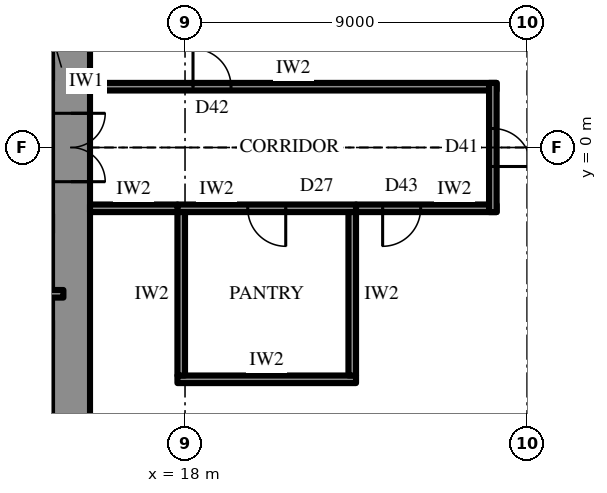
"""IFC4 building model, lengths in metres.
Left out: names, types, materials, properties, quantities, classifications, styles, units other than length and angle.
Written with IfcOpenShell. Run it as: python <this file> out.ifc"""

import sys

from ifc_helpers import new_model, si_unit, direction, frame, frame_2d, origin, place, context, subcontext, project, spatial, rectangle, extrude, element, fill, save


model = new_model("IFC4")
c1 = context("Model", 3, precision=1e-05, world=origin(), true_north=direction((0.0, 1.0)))
c2 = subcontext(c1, "Body", "Model", "MODEL_VIEW")
j1 = project(units=[si_unit("LENGTHUNIT", "METRE"), si_unit("PLANEANGLEUNIT", "RADIAN")], contexts=[c1])
p1 = place(None, origin())
s1 = spatial("IfcSite", under=j1, at=p1, CompositionType="ELEMENT")
p2 = place(p1, origin())
s2 = spatial("IfcBuilding", under=s1, at=p2, CompositionType="ELEMENT")
p3 = place(p2, frame((0.0, 0.0, 278.5)))
s3 = spatial("IfcBuildingStorey", under=s2, at=p3, CompositionType="ELEMENT", Elevation=278.5)
p4 = place(p3, frame((15.0, -10.7, 0.0), z_axis=(0.0, 0.0, 1.0), x_axis=(0.0, 1.0, 0.0)))
e1 = element("IfcWall", 1, at=p4, inside=s3, PredefinedType="SHEAR", context=c2, shape_type="SweptSolid", body=[
    extrude(rectangle(XDim=21.4, YDim=1.0, at=frame_2d((10.7, 0.0))), origin(), (0.0, 0.0, 1.0), 4.2),
])
p5 = place(p4, frame((9.8, 0.0, 0.0)))
e2 = element("IfcOpeningElement", 2, at=p5, cuts=e1, PredefinedType="OPENING", context=c2, shape_type="SweptSolid", body=[
    extrude(rectangle(XDim=1.8, YDim=2.4, at=frame_2d((0.9, 1.2))), frame((0.0, 0.51, 0.0), z_axis=(0.0, -1.0, 0.0), x_axis=(1.0, 0.0, 0.0)), (0.0, 0.0, 1.0), 1.02),
])
p6 = place(p3, frame((12.3, 2.0, 0.0), z_axis=(0.0, 0.0, 1.0), x_axis=(1.0, 0.0, 0.0)))
e3 = element("IfcWall", 3, at=p6, inside=s3, PredefinedType="SHEAR", context=c2, shape_type="SweptSolid", body=[
    extrude(rectangle(XDim=2.2, YDim=0.5, at=frame_2d((1.1, 0.0))), origin(), (0.0, 0.0, 1.0), 4.2),
])
p7 = place(p6, frame((0.8, 0.0, 0.0)))
e4 = element("IfcOpeningElement", 4, at=p7, cuts=e3, PredefinedType="OPENING", context=c2, shape_type="SweptSolid", body=[
    extrude(rectangle(XDim=0.9, YDim=2.2, at=frame_2d((0.45, 1.1))), frame((0.0, 0.26, 0.0), z_axis=(0.0, -1.0, 0.0), x_axis=(1.0, 0.0, 0.0)), (0.0, 0.0, 1.0), 0.52),
])
p8 = place(p3, frame((18.707, -25.299, 0.0), z_axis=(0.0, 0.0, 1.0), x_axis=(0.500000442367, 0.866025148383, 0.0)))
e5 = element("IfcWall", 5, at=p8, inside=s3, PredefinedType="SOLIDWALL", context=c2, shape_type="SweptSolid", body=[
    extrude(rectangle(XDim=25.113, YDim=0.3, at=frame_2d((12.556, 0.0))), origin(), (0.0, 0.0, 1.0), 2.8),
])
p9 = place(p8, frame((4.278, 0.0, 0.6)))
e6 = element("IfcOpeningElement", 6, at=p9, cuts=e5, PredefinedType="OPENING", context=c2, shape_type="SweptSolid", body=[
    extrude(rectangle(XDim=2.7, YDim=1.95, at=frame_2d((1.35, 0.975))), frame((0.0, 0.16, 0.0), z_axis=(0.0, -1.0, 0.0), x_axis=(1.0, 0.0, 0.0)), (0.0, 0.0, 1.0), 0.32),
])
p10 = place(p8, frame((9.647, 0.0, 0.0)))
e7 = element("IfcOpeningElement", 7, at=p10, cuts=e5, PredefinedType="OPENING", context=c2, shape_type="SweptSolid", body=[
    extrude(rectangle(XDim=1.2, YDim=2.4, at=frame_2d((0.6, 1.2))), frame((0.0, 0.16, 0.0), z_axis=(0.0, -1.0, 0.0), x_axis=(1.0, 0.0, 0.0)), (0.0, 0.0, 1.0), 0.32),
])
p11 = place(p8, frame((13.516, 0.0, 0.6)))
e8 = element("IfcOpeningElement", 8, at=p11, cuts=e5, PredefinedType="OPENING", context=c2, shape_type="SweptSolid", body=[
    extrude(rectangle(XDim=2.7, YDim=1.95, at=frame_2d((1.35, 0.975))), frame((0.0, 0.16, 0.0), z_axis=(0.0, -1.0, 0.0), x_axis=(1.0, 0.0, 0.0)), (0.0, 0.0, 1.0), 0.32),
])
p12 = place(p8, frame((18.135, 0.0, 0.6)))
e9 = element("IfcOpeningElement", 9, at=p12, cuts=e5, PredefinedType="OPENING", context=c2, shape_type="SweptSolid", body=[
    extrude(rectangle(XDim=2.7, YDim=1.95, at=frame_2d((1.35, 0.975))), frame((0.0, 0.16, 0.0), z_axis=(0.0, -1.0, 0.0), x_axis=(1.0, 0.0, 0.0)), (0.0, 0.0, 1.0), 0.32),
])
p13 = place(p3, frame((14.8, -3.85, 0.0), z_axis=(0.0, 0.0, 1.0), x_axis=(-1.0, 0.0, 0.0)))
e10 = element("IfcWall", 10, at=p13, inside=s3, PredefinedType="PARTITIONING", context=c2, shape_type="SweptSolid", body=[
    extrude(rectangle(XDim=2.5, YDim=0.2, at=frame_2d((1.25, 0.0))), origin(), (0.0, 0.0, 1.0), 4.0),
])
p14 = place(p3, frame((17.8, -1.6, 0.0), z_axis=(0.0, 0.0, 1.0), x_axis=(1.0, 0.0, 0.0)))
e11 = element("IfcWall", 11, at=p14, inside=s3, PredefinedType="PARTITIONING", context=c2, shape_type="SweptSolid", body=[
    extrude(rectangle(XDim=4.7, YDim=0.2, at=frame_2d((2.35, 0.0))), origin(), (0.0, 0.0, 1.0), 4.0),
])
p15 = place(p14, frame((1.85, 0.0, 0.0)))
e12 = element("IfcOpeningElement", 12, at=p15, cuts=e11, PredefinedType="OPENING", context=c2, shape_type="SweptSolid", body=[
    extrude(rectangle(XDim=1.0, YDim=2.2, at=frame_2d((0.5, 1.1))), frame((0.0, 0.11, 0.0), z_axis=(0.0, -1.0, 0.0), x_axis=(1.0, 0.0, 0.0)), (0.0, 0.0, 1.0), 0.22),
])
p16 = place(p3, frame((17.8, -6.1, 0.0), z_axis=(0.0, 0.0, 1.0), x_axis=(1.0, 0.0, 0.0)))
e13 = element("IfcWall", 13, at=p16, inside=s3, PredefinedType="PARTITIONING", context=c2, shape_type="SweptSolid", body=[
    extrude(rectangle(XDim=4.7, YDim=0.2, at=frame_2d((2.35, 0.0))), origin(), (0.0, 0.0, 1.0), 4.0),
])
for number, where, z_axis, x_axis in (
    (14, (17.9, -1.7, 0.0), (0.0, 0.0, 1.0), (0.0, -1.0, 0.0)),
    (15, (22.4, -1.7, 0.0), (0.0, 0.0, 1.0), (0.0, -1.0, 0.0)),
):
    element("IfcWall", number, at=place(p3, frame(where, z_axis=z_axis, x_axis=x_axis)), inside=s3, PredefinedType="PARTITIONING", context=c2, shape_type="SweptSolid", body=[
        extrude(rectangle(XDim=4.3, YDim=0.2, at=frame_2d((2.15, 0.0))), origin(), (0.0, 0.0, 1.0), 4.0),
    ])
p17 = place(p3, frame((15.5, 1.6, 0.0), z_axis=(0.0, 0.0, 1.0), x_axis=(1.0, 0.0, 0.0)))
e16 = element("IfcWall", 16, at=p17, inside=s3, PredefinedType="PARTITIONING", context=c2, shape_type="SweptSolid", body=[
    extrude(rectangle(XDim=10.7, YDim=0.2, at=frame_2d((5.35, 0.0))), origin(), (0.0, 0.0, 1.0), 4.0),
])
p18 = place(p17, frame((2.71, 0.0, 0.0)))
e17 = element("IfcOpeningElement", 17, at=p18, cuts=e16, PredefinedType="OPENING", context=c2, shape_type="SweptSolid", body=[
    extrude(rectangle(XDim=1.0, YDim=2.2, at=frame_2d((0.5, 1.1))), frame((0.0, 0.11, 0.0), z_axis=(0.0, -1.0, 0.0), x_axis=(1.0, 0.0, 0.0)), (0.0, 0.0, 1.0), 0.22),
])
p19 = place(p3, frame((15.5, -1.6, 0.0), z_axis=(0.0, 0.0, 1.0), x_axis=(1.0, 0.0, 0.0)))
e18 = element("IfcWall", 18, at=p19, inside=s3, PredefinedType="PARTITIONING", context=c2, shape_type="SweptSolid", body=[
    extrude(rectangle(XDim=2.3, YDim=0.2, at=frame_2d((1.15, 0.0))), origin(), (0.0, 0.0, 1.0), 4.0),
])
p20 = place(p3, frame((22.5, -1.6, 0.0), z_axis=(0.0, 0.0, 1.0), x_axis=(1.0, 0.0, 0.0)))
e19 = element("IfcWall", 19, at=p20, inside=s3, PredefinedType="PARTITIONING", context=c2, shape_type="SweptSolid", body=[
    extrude(rectangle(XDim=3.7, YDim=0.2, at=frame_2d((1.85, 0.0))), origin(), (0.0, 0.0, 1.0), 4.0),
])
p21 = place(p20, frame((0.7, 0.0, 0.0)))
e20 = element("IfcOpeningElement", 20, at=p21, cuts=e19, PredefinedType="OPENING", context=c2, shape_type="SweptSolid", body=[
    extrude(rectangle(XDim=1.0, YDim=2.2, at=frame_2d((0.5, 1.1))), frame((0.0, 0.11, 0.0), z_axis=(0.0, -1.0, 0.0), x_axis=(1.0, 0.0, 0.0)), (0.0, 0.0, 1.0), 0.22),
])
p22 = place(p3, frame((26.1, -1.7, 0.0), z_axis=(0.0, 0.0, 1.0), x_axis=(0.0, 1.0, 0.0)))
e21 = element("IfcWall", 21, at=p22, inside=s3, PredefinedType="PARTITIONING", context=c2, shape_type="SweptSolid", body=[
    extrude(rectangle(XDim=3.4, YDim=0.2, at=frame_2d((1.7, 0.0))), origin(), (0.0, 0.0, 1.0), 4.0),
])
p23 = place(p22, frame((1.2, 0.0, 0.0)))
e22 = element("IfcOpeningElement", 22, at=p23, cuts=e21, PredefinedType="OPENING", context=c2, shape_type="SweptSolid", body=[
    extrude(rectangle(XDim=1.0, YDim=2.2, at=frame_2d((0.5, 1.1))), frame((0.0, 0.11, 0.0), z_axis=(0.0, -1.0, 0.0), x_axis=(1.0, 0.0, 0.0)), (0.0, 0.0, 1.0), 0.22),
])
p24 = place(p5, frame((1.8, 0.0, 0.0), z_axis=(0.0, 0.0, 1.0), x_axis=(-1.0, 0.0, 0.0)))
e23 = element("IfcDoor", 23, at=p24, inside=s3, OperationType="DOUBLE_DOOR_SINGLE_SWING", PredefinedType="DOOR", context=c2, shape_type="SweptSolid", body=[
    extrude(rectangle(XDim=1.8, YDim=2.4, at=frame_2d((0.9, 1.2))), frame((0.0, 0.025, 0.0), z_axis=(0.0, -1.0, 0.0), x_axis=(1.0, 0.0, 0.0)), (0.0, 0.0, 1.0), 0.05),
])
fill(e2, e23)
p25 = place(p15, frame((1.0, 0.0, 0.0), z_axis=(0.0, 0.0, 1.0), x_axis=(-1.0, 0.0, 0.0)))
e24 = element("IfcDoor", 24, at=p25, inside=s3, OperationType="SINGLE_SWING_RIGHT", PredefinedType="DOOR", context=c2, shape_type="SweptSolid", body=[
    extrude(rectangle(XDim=1.0, YDim=2.2, at=frame_2d((0.5, 1.1))), frame((0.0, 0.025, 0.0), z_axis=(0.0, -1.0, 0.0), x_axis=(1.0, 0.0, 0.0)), (0.0, 0.0, 1.0), 0.05),
])
fill(e12, e24)
p26 = place(p18, origin())
e25 = element("IfcDoor", 25, at=p26, inside=s3, OperationType="SINGLE_SWING_RIGHT", PredefinedType="DOOR", context=c2, shape_type="SweptSolid", body=[
    extrude(rectangle(XDim=1.0, YDim=2.2, at=frame_2d((0.5, 1.1))), frame((0.0, 0.025, 0.0), z_axis=(0.0, -1.0, 0.0), x_axis=(1.0, 0.0, 0.0)), (0.0, 0.0, 1.0), 0.05),
])
fill(e17, e25)
p27 = place(p21, frame((1.0, 0.0, 0.0), z_axis=(0.0, 0.0, 1.0), x_axis=(-1.0, 0.0, 0.0)))
e26 = element("IfcDoor", 26, at=p27, inside=s3, OperationType="SINGLE_SWING_LEFT", PredefinedType="DOOR", context=c2, shape_type="SweptSolid", body=[
    extrude(rectangle(XDim=1.0, YDim=2.2, at=frame_2d((0.5, 1.1))), frame((0.0, 0.025, 0.0), z_axis=(0.0, -1.0, 0.0), x_axis=(1.0, 0.0, 0.0)), (0.0, 0.0, 1.0), 0.05),
])
fill(e20, e26)
p28 = place(p23, frame((1.0, 0.0, 0.0), z_axis=(0.0, 0.0, 1.0), x_axis=(-1.0, 0.0, 0.0)))
e27 = element("IfcDoor", 27, at=p28, inside=s3, OperationType="SINGLE_SWING_LEFT", PredefinedType="DOOR", context=c2, shape_type="SweptSolid", body=[
    extrude(rectangle(XDim=1.0, YDim=2.2, at=frame_2d((0.5, 1.1))), frame((0.0, 0.025, 0.0), z_axis=(0.0, -1.0, 0.0), x_axis=(1.0, 0.0, 0.0)), (0.0, 0.0, 1.0), 0.05),
])
fill(e22, e27)
save(model, sys.argv[1])
